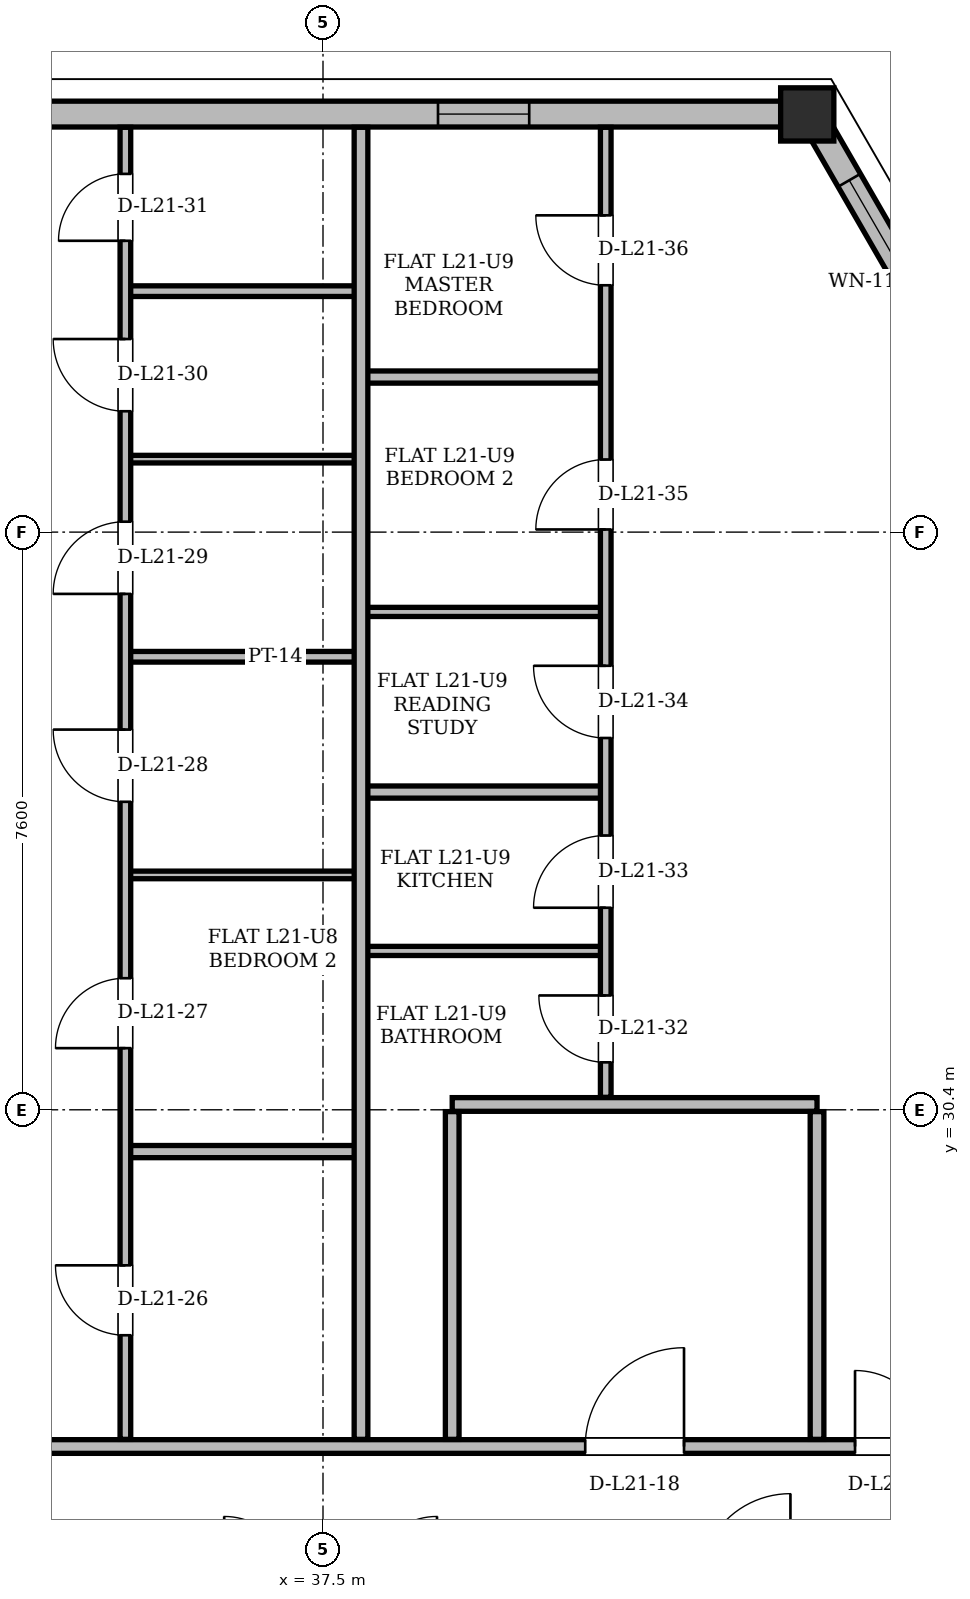
"""IFC4 building model, lengths in metres.
Left out: names, types, materials, properties, quantities, classifications, styles, units other than length and angle.
Written with IfcOpenShell. Run it as: python <this file> out.ifc"""

import sys

from ifc_helpers import new_model, si_unit, direction, frame, frame_2d, origin, origin_2d, place, context, subcontext, project, spatial, rectangle, hollow_rectangle, extrude, element, fill, save


model = new_model("IFC4")
c1 = context("Model", 3, precision=1e-05, world=origin(), true_north=direction((0.0, 1.0)))
c2 = subcontext(c1, "Body", "Model", "MODEL_VIEW")
j1 = project(units=[si_unit("LENGTHUNIT", "METRE"), si_unit("PLANEANGLEUNIT", "RADIAN")], contexts=[c1])
p1 = place(None, origin())
s1 = spatial("IfcSite", under=j1, at=p1, CompositionType="ELEMENT")
p2 = place(p1, origin())
s2 = spatial("IfcBuilding", under=s1, at=p2, CompositionType="ELEMENT")
p3 = place(p2, frame((0.0, 0.0, 82.5)))
s3 = spatial("IfcBuildingStorey", under=s2, at=p3, CompositionType="ELEMENT", Elevation=82.5)
p4 = place(p3, frame((43.921, 43.5, 0.004), z_axis=(-0.027795269096, -0.002582445539, 0.999610301063), x_axis=(0.092511107085, -0.995711652571, 0.0)))
e1 = element("IfcColumn", 1, at=p4, inside=s3, PredefinedType="COLUMN", context=c2, shape_type="SweptSolid", body=[
    extrude(hollow_rectangle(XDim=0.7, YDim=0.7, WallThickness=0.055, at=origin_2d()), origin(), (0.0, 0.0, 1.0), 3.593),
])
p5 = place(p3, frame((60.975, 13.961, 0.0), z_axis=(0.0, 0.0, 1.0), x_axis=(-0.499998999238, 0.866025981574, 0.0)))
e2 = element("IfcWall", 2, at=p5, inside=s3, PredefinedType="SOLIDWALL", context=c2, shape_type="SweptSolid", body=[
    extrude(rectangle(XDim=34.108, YDim=0.34, at=frame_2d((17.054, 0.0))), origin(), (0.0, 0.0, 1.0), 2.578),
])
p6 = place(p5, frame((6.369, 0.0, 0.0)))
e3 = element("IfcOpeningElement", 3, at=p6, cuts=e2, PredefinedType="OPENING", context=c2, shape_type="SweptSolid", body=[
    extrude(rectangle(XDim=1.5, YDim=2.2, at=frame_2d((0.75, 1.1))), frame((0.0, 0.17, 0.0), z_axis=(0.0, -1.0, 0.0), x_axis=(1.0, 0.0, 0.0)), (0.0, 0.0, 1.0), 0.34),
])
p7 = place(p5, frame((24.784, 0.0, 0.0)))
e4 = element("IfcOpeningElement", 4, at=p7, cuts=e2, PredefinedType="OPENING", context=c2, shape_type="SweptSolid", body=[
    extrude(rectangle(XDim=1.5, YDim=2.2, at=frame_2d((0.75, 1.1))), frame((0.0, 0.17, 0.0), z_axis=(0.0, -1.0, 0.0), x_axis=(1.0, 0.0, 0.0)), (0.0, 0.0, 1.0), 0.34),
])
p8 = place(p5, frame((1.56, 0.0, 0.85)))
e5 = element("IfcOpeningElement", 5, at=p8, cuts=e2, PredefinedType="OPENING", context=c2, shape_type="SweptSolid", body=[
    extrude(rectangle(XDim=1.2, YDim=1.48, at=frame_2d((0.6, 0.74))), frame((0.0, 0.17, 0.0), z_axis=(0.0, -1.0, 0.0), x_axis=(1.0, 0.0, 0.0)), (0.0, 0.0, 1.0), 0.34),
])
p9 = place(p5, frame((30.603, 0.0, 0.85)))
e6 = element("IfcOpeningElement", 6, at=p9, cuts=e2, PredefinedType="OPENING", context=c2, shape_type="SweptSolid", body=[
    extrude(rectangle(XDim=2.5, YDim=1.618, at=frame_2d((1.25, 0.809))), frame((0.0, 0.17, 0.0), z_axis=(0.0, -1.0, 0.0), x_axis=(1.0, 0.0, 0.0)), (0.0, 0.0, 1.0), 0.34),
])
p10 = place(p5, frame((20.212, 0.0, 0.85)))
e7 = element("IfcOpeningElement", 7, at=p10, cuts=e2, PredefinedType="OPENING", context=c2, shape_type="SweptSolid", body=[
    extrude(rectangle(XDim=2.4, YDim=1.618, at=frame_2d((1.2, 0.809))), frame((0.0, 0.17, 0.0), z_axis=(0.0, -1.0, 0.0), x_axis=(1.0, 0.0, 0.0)), (0.0, 0.0, 1.0), 0.34),
])
p11 = place(p5, frame((15.221, 0.0, 0.85)))
e8 = element("IfcOpeningElement", 8, at=p11, cuts=e2, PredefinedType="OPENING", context=c2, shape_type="SweptSolid", body=[
    extrude(rectangle(XDim=1.2, YDim=1.48, at=frame_2d((0.6, 0.74))), frame((0.0, 0.17, 0.0), z_axis=(0.0, -1.0, 0.0), x_axis=(1.0, 0.0, 0.0)), (0.0, 0.0, 1.0), 0.34),
])
p12 = place(p5, frame((17.561, 0.0, 0.85)))
e9 = element("IfcOpeningElement", 9, at=p12, cuts=e2, PredefinedType="OPENING", context=c2, shape_type="SweptSolid", body=[
    extrude(rectangle(XDim=1.4, YDim=1.6, at=frame_2d((0.7, 0.8))), frame((0.0, 0.17, 0.0), z_axis=(0.0, -1.0, 0.0), x_axis=(1.0, 0.0, 0.0)), (0.0, 0.0, 1.0), 0.34),
])
p13 = place(p3, frame((43.921, 43.5, 0.0), z_axis=(0.0, 0.0, 1.0), x_axis=(-1.0, 0.0, 0.0)))
e10 = element("IfcWall", 10, at=p13, inside=s3, PredefinedType="SOLIDWALL", context=c2, shape_type="SweptSolid", body=[
    extrude(rectangle(XDim=12.842, YDim=0.34, at=frame_2d((6.421, 0.0))), origin(), (0.0, 0.0, 1.0), 2.578),
])
p14 = place(p13, frame((3.708, 0.0, 0.85)))
e11 = element("IfcOpeningElement", 11, at=p14, cuts=e10, PredefinedType="OPENING", context=c2, shape_type="SweptSolid", body=[
    extrude(rectangle(XDim=1.2, YDim=1.48, at=frame_2d((0.6, 0.74))), frame((0.0, 0.17, 0.0), z_axis=(0.0, -1.0, 0.0), x_axis=(1.0, 0.0, 0.0)), (0.0, 0.0, 1.0), 0.34),
])
p15 = place(p3, frame((27.55, 25.97, 0.0), z_axis=(0.0, 0.0, 1.0), x_axis=(1.0, 0.0, 0.0)))
e12 = element("IfcWall", 12, at=p15, inside=s3, PredefinedType="PARTITIONING", context=c2, shape_type="SweptSolid", body=[
    extrude(rectangle(XDim=19.9, YDim=0.18, at=frame_2d((9.95, 0.0))), origin(), (0.0, 0.0, 1.0), 2.814),
])
p16 = place(p15, frame((0.425, 0.0, 0.0)))
e13 = element("IfcOpeningElement", 13, at=p16, cuts=e12, PredefinedType="OPENING", context=c2, shape_type="SweptSolid", body=[
    extrude(rectangle(XDim=1.0, YDim=2.18, at=frame_2d((0.5, 1.09))), frame((0.0, 0.09, 0.0), z_axis=(0.0, -1.0, 0.0), x_axis=(1.0, 0.0, 0.0)), (0.0, 0.0, 1.0), 0.18),
])
p17 = place(p15, frame((4.222, 0.0, 0.0)))
e14 = element("IfcOpeningElement", 14, at=p17, cuts=e12, PredefinedType="OPENING", context=c2, shape_type="SweptSolid", body=[
    extrude(rectangle(XDim=1.0, YDim=2.18, at=frame_2d((0.5, 1.09))), frame((0.0, 0.09, 0.0), z_axis=(0.0, -1.0, 0.0), x_axis=(1.0, 0.0, 0.0)), (0.0, 0.0, 1.0), 0.18),
])
p18 = place(p15, frame((13.4, 0.0, 0.0)))
e15 = element("IfcOpeningElement", 15, at=p18, cuts=e12, PredefinedType="OPENING", context=c2, shape_type="SweptSolid", body=[
    extrude(rectangle(XDim=1.3, YDim=2.2, at=frame_2d((0.65, 1.1))), frame((0.0, 0.09, 0.0), z_axis=(0.0, -1.0, 0.0), x_axis=(1.0, 0.0, 0.0)), (0.0, 0.0, 1.0), 0.18),
])
p19 = place(p15, frame((16.95, 0.0, 0.0)))
e16 = element("IfcOpeningElement", 16, at=p19, cuts=e12, PredefinedType="OPENING", context=c2, shape_type="SweptSolid", body=[
    extrude(rectangle(XDim=1.0, YDim=2.18, at=frame_2d((0.5, 1.09))), frame((0.0, 0.09, 0.0), z_axis=(0.0, -1.0, 0.0), x_axis=(1.0, 0.0, 0.0)), (0.0, 0.0, 1.0), 0.18),
])
p20 = place(p3, frame((34.9, 29.85, 0.0), z_axis=(0.0, 0.0, 1.0), x_axis=(1.0, 0.0, 0.0)))
e17 = element("IfcWall", 17, at=p20, inside=s3, PredefinedType="PARTITIONING", context=c2, shape_type="SweptSolid", body=[
    extrude(rectangle(XDim=3.15, YDim=0.16, at=frame_2d((1.575, 0.0))), origin(), (0.0, 0.0, 1.0), 3.36),
])
p21 = place(p3, frame((39.2, 30.47, 0.0), z_axis=(0.0, 0.0, 1.0), x_axis=(1.0, 0.0, 0.0)))
e18 = element("IfcWall", 18, at=p21, inside=s3, PredefinedType="PARTITIONING", context=c2, shape_type="SweptSolid", body=[
    extrude(rectangle(XDim=4.8, YDim=0.18, at=frame_2d((2.4, 0.0))), origin(), (0.0, 0.0, 1.0), 3.36),
])
p22 = place(p3, frame((37.95, 32.49, 0.0), z_axis=(0.0, 0.0, 1.0), x_axis=(1.0, 0.0, 0.0)))
e19 = element("IfcWall", 19, at=p22, inside=s3, PredefinedType="PARTITIONING", context=c2, shape_type="SweptSolid", body=[
    extrude(rectangle(XDim=3.27, YDim=0.12, at=frame_2d((1.635, 0.0))), origin(), (0.0, 0.0, 1.0), 3.36),
])
p23 = place(p3, frame((34.9, 33.49, 0.0), z_axis=(0.0, 0.0, 1.0), x_axis=(1.0, 0.0, 0.0)))
e20 = element("IfcWall", 20, at=p23, inside=s3, PredefinedType="PARTITIONING", context=c2, shape_type="SweptSolid", body=[
    extrude(rectangle(XDim=3.15, YDim=0.1, at=frame_2d((1.575, 0.0))), origin(), (0.0, 0.0, 1.0), 3.36),
])
p24 = place(p3, frame((37.95, 34.58, 0.0), z_axis=(0.0, 0.0, 1.0), x_axis=(1.0, 0.0, 0.0)))
e21 = element("IfcWall", 21, at=p24, inside=s3, PredefinedType="PARTITIONING", context=c2, shape_type="SweptSolid", body=[
    extrude(rectangle(XDim=3.27, YDim=0.16, at=frame_2d((1.635, 0.0))), origin(), (0.0, 0.0, 1.0), 3.36),
])
p25 = place(p3, frame((34.9, 36.36, 0.0), z_axis=(0.0, 0.0, 1.0), x_axis=(1.0, 0.0, 0.0)))
e22 = element("IfcWall", 22, at=p25, inside=s3, PredefinedType="PARTITIONING", context=c2, shape_type="SweptSolid", body=[
    extrude(rectangle(XDim=3.15, YDim=0.14, at=frame_2d((1.575, 0.0))), origin(), (0.0, 0.0, 1.0), 3.36),
])
p26 = place(p3, frame((37.95, 36.95, 0.0), z_axis=(0.0, 0.0, 1.0), x_axis=(1.0, 0.0, 0.0)))
e23 = element("IfcWall", 23, at=p26, inside=s3, PredefinedType="PARTITIONING", context=c2, shape_type="SweptSolid", body=[
    extrude(rectangle(XDim=3.27, YDim=0.12, at=frame_2d((1.635, 0.0))), origin(), (0.0, 0.0, 1.0), 3.36),
])
p27 = place(p3, frame((34.9, 38.96, 0.0), z_axis=(0.0, 0.0, 1.0), x_axis=(1.0, 0.0, 0.0)))
e24 = element("IfcWall", 24, at=p27, inside=s3, PredefinedType="PARTITIONING", context=c2, shape_type="SweptSolid", body=[
    extrude(rectangle(XDim=3.15, YDim=0.1, at=frame_2d((1.575, 0.0))), origin(), (0.0, 0.0, 1.0), 3.36),
])
p28 = place(p3, frame((37.95, 40.04, 0.0), z_axis=(0.0, 0.0, 1.0), x_axis=(1.0, 0.0, 0.0)))
e25 = element("IfcWall", 25, at=p28, inside=s3, PredefinedType="PARTITIONING", context=c2, shape_type="SweptSolid", body=[
    extrude(rectangle(XDim=3.27, YDim=0.16, at=frame_2d((1.635, 0.0))), origin(), (0.0, 0.0, 1.0), 3.36),
])
p29 = place(p3, frame((34.9, 41.17, 0.0), z_axis=(0.0, 0.0, 1.0), x_axis=(1.0, 0.0, 0.0)))
e26 = element("IfcWall", 26, at=p29, inside=s3, PredefinedType="PARTITIONING", context=c2, shape_type="SweptSolid", body=[
    extrude(rectangle(XDim=3.15, YDim=0.14, at=frame_2d((1.575, 0.0))), origin(), (0.0, 0.0, 1.0), 3.36),
])
p30 = place(p3, frame((34.9, 26.064, 0.0), z_axis=(0.0, 0.0, 1.0), x_axis=(0.0, 1.0, 0.0)))
e27 = element("IfcWall", 27, at=p30, inside=s3, PredefinedType="PARTITIONING", context=c2, shape_type="SweptSolid", body=[
    extrude(rectangle(XDim=17.262, YDim=0.14, at=frame_2d((8.631, 0.0))), origin(), (0.0, 0.0, 1.0), 3.36),
])
p31 = place(p30, frame((1.37, 0.0, 0.0)))
e28 = element("IfcOpeningElement", 28, at=p31, cuts=e27, PredefinedType="OPENING", context=c2, shape_type="SweptSolid", body=[
    extrude(rectangle(XDim=0.92, YDim=2.12, at=frame_2d((0.46, 1.06))), frame((0.0, 0.07, 0.0), z_axis=(0.0, -1.0, 0.0), x_axis=(1.0, 0.0, 0.0)), (0.0, 0.0, 1.0), 0.14),
])
p32 = place(p30, frame((5.147, 0.0, 0.0)))
e29 = element("IfcOpeningElement", 29, at=p32, cuts=e27, PredefinedType="OPENING", context=c2, shape_type="SweptSolid", body=[
    extrude(rectangle(XDim=0.92, YDim=2.12, at=frame_2d((0.46, 1.06))), frame((0.0, 0.07, 0.0), z_axis=(0.0, -1.0, 0.0), x_axis=(1.0, 0.0, 0.0)), (0.0, 0.0, 1.0), 0.14),
])
p33 = place(p30, frame((8.388, 0.0, 0.0)))
e30 = element("IfcOpeningElement", 30, at=p33, cuts=e27, PredefinedType="OPENING", context=c2, shape_type="SweptSolid", body=[
    extrude(rectangle(XDim=0.95, YDim=2.1, at=frame_2d((0.475, 1.05))), frame((0.0, 0.07, 0.0), z_axis=(0.0, -1.0, 0.0), x_axis=(1.0, 0.0, 0.0)), (0.0, 0.0, 1.0), 0.14),
])
p34 = place(p30, frame((11.123, 0.0, 0.0)))
e31 = element("IfcOpeningElement", 31, at=p34, cuts=e27, PredefinedType="OPENING", context=c2, shape_type="SweptSolid", body=[
    extrude(rectangle(XDim=0.95, YDim=2.1, at=frame_2d((0.475, 1.05))), frame((0.0, 0.07, 0.0), z_axis=(0.0, -1.0, 0.0), x_axis=(1.0, 0.0, 0.0)), (0.0, 0.0, 1.0), 0.14),
])
p35 = place(p30, frame((13.526, 0.0, 0.0)))
e32 = element("IfcOpeningElement", 32, at=p35, cuts=e27, PredefinedType="OPENING", context=c2, shape_type="SweptSolid", body=[
    extrude(rectangle(XDim=0.95, YDim=2.1, at=frame_2d((0.475, 1.05))), frame((0.0, 0.07, 0.0), z_axis=(0.0, -1.0, 0.0), x_axis=(1.0, 0.0, 0.0)), (0.0, 0.0, 1.0), 0.14),
])
p36 = place(p30, frame((15.769, 0.0, 0.0)))
e33 = element("IfcOpeningElement", 33, at=p36, cuts=e27, PredefinedType="OPENING", context=c2, shape_type="SweptSolid", body=[
    extrude(rectangle(XDim=0.88, YDim=2.08, at=frame_2d((0.44, 1.04))), frame((0.0, 0.07, 0.0), z_axis=(0.0, -1.0, 0.0), x_axis=(1.0, 0.0, 0.0)), (0.0, 0.0, 1.0), 0.14),
])
p37 = place(p3, frame((38.0, 26.064, 0.0), z_axis=(0.0, 0.0, 1.0), x_axis=(0.0, 1.0, 0.0)))
e34 = element("IfcWall", 34, at=p37, inside=s3, PredefinedType="PARTITIONING", context=c2, shape_type="SweptSolid", body=[
    extrude(rectangle(XDim=17.262, YDim=0.18, at=frame_2d((8.631, 0.0))), origin(), (0.0, 0.0, 1.0), 3.36),
])
p38 = place(p3, frame((39.2, 26.064, 0.0), z_axis=(0.0, 0.0, 1.0), x_axis=(0.0, 1.0, 0.0)))
e35 = element("IfcWall", 35, at=p38, inside=s3, PredefinedType="PARTITIONING", context=c2, shape_type="SweptSolid", body=[
    extrude(rectangle(XDim=4.312, YDim=0.18, at=frame_2d((2.156, 0.0))), origin(), (0.0, 0.0, 1.0), 3.36),
])
p39 = place(p3, frame((41.22, 30.564, 0.0), z_axis=(0.0, 0.0, 1.0), x_axis=(0.0, 1.0, 0.0)))
e36 = element("IfcWall", 36, at=p39, inside=s3, PredefinedType="PARTITIONING", context=c2, shape_type="SweptSolid", body=[
    extrude(rectangle(XDim=12.762, YDim=0.14, at=frame_2d((6.381, 0.0))), origin(), (0.0, 0.0, 1.0), 3.36),
])
p40 = place(p39, frame((0.46, 0.0, 0.0)))
e37 = element("IfcOpeningElement", 37, at=p40, cuts=e36, PredefinedType="OPENING", context=c2, shape_type="SweptSolid", body=[
    extrude(rectangle(XDim=0.88, YDim=2.08, at=frame_2d((0.44, 1.04))), frame((0.0, 0.07, 0.0), z_axis=(0.0, -1.0, 0.0), x_axis=(1.0, 0.0, 0.0)), (0.0, 0.0, 1.0), 0.14),
])
p41 = place(p39, frame((2.494, 0.0, 0.0)))
e38 = element("IfcOpeningElement", 38, at=p41, cuts=e36, PredefinedType="OPENING", context=c2, shape_type="SweptSolid", body=[
    extrude(rectangle(XDim=0.95, YDim=2.1, at=frame_2d((0.475, 1.05))), frame((0.0, 0.07, 0.0), z_axis=(0.0, -1.0, 0.0), x_axis=(1.0, 0.0, 0.0)), (0.0, 0.0, 1.0), 0.14),
])
p42 = place(p39, frame((4.727, 0.0, 0.0)))
e39 = element("IfcOpeningElement", 39, at=p42, cuts=e36, PredefinedType="OPENING", context=c2, shape_type="SweptSolid", body=[
    extrude(rectangle(XDim=0.95, YDim=2.1, at=frame_2d((0.475, 1.05))), frame((0.0, 0.07, 0.0), z_axis=(0.0, -1.0, 0.0), x_axis=(1.0, 0.0, 0.0)), (0.0, 0.0, 1.0), 0.14),
])
p43 = place(p39, frame((7.471, 0.0, 0.0)))
e40 = element("IfcOpeningElement", 40, at=p43, cuts=e36, PredefinedType="OPENING", context=c2, shape_type="SweptSolid", body=[
    extrude(rectangle(XDim=0.92, YDim=2.12, at=frame_2d((0.46, 1.06))), frame((0.0, 0.07, 0.0), z_axis=(0.0, -1.0, 0.0), x_axis=(1.0, 0.0, 0.0)), (0.0, 0.0, 1.0), 0.14),
])
p44 = place(p39, frame((10.683, 0.0, 0.0)))
e41 = element("IfcOpeningElement", 41, at=p44, cuts=e36, PredefinedType="OPENING", context=c2, shape_type="SweptSolid", body=[
    extrude(rectangle(XDim=0.92, YDim=2.12, at=frame_2d((0.46, 1.06))), frame((0.0, 0.07, 0.0), z_axis=(0.0, -1.0, 0.0), x_axis=(1.0, 0.0, 0.0)), (0.0, 0.0, 1.0), 0.14),
])
p45 = place(p3, frame((44.0, 26.064, 0.0), z_axis=(0.0, 0.0, 1.0), x_axis=(0.0, 1.0, 0.0)))
e42 = element("IfcWall", 42, at=p45, inside=s3, PredefinedType="PARTITIONING", context=c2, shape_type="SweptSolid", body=[
    extrude(rectangle(XDim=4.312, YDim=0.18, at=frame_2d((2.156, 0.0))), origin(), (0.0, 0.0, 1.0), 2.946),
])
p46 = place(p9, origin())
e43 = element("IfcWindow", 43, at=p46, inside=s3, PartitioningType="SINGLE_PANEL", PredefinedType="WINDOW", context=c2, shape_type="SweptSolid", body=[
    extrude(rectangle(XDim=2.5, YDim=1.618, at=frame_2d((1.25, 0.809))), frame((0.0, 0.03, 0.0), z_axis=(0.0, -1.0, 0.0), x_axis=(1.0, 0.0, 0.0)), (0.0, 0.0, 1.0), 0.06),
])
fill(e6, e43)
p47 = place(p14, origin())
e44 = element("IfcWindow", 44, at=p47, inside=s3, PartitioningType="SINGLE_PANEL", PredefinedType="WINDOW", context=c2, shape_type="SweptSolid", body=[
    extrude(rectangle(XDim=1.2, YDim=1.48, at=frame_2d((0.6, 0.74))), frame((0.0, 0.03, 0.0), z_axis=(0.0, -1.0, 0.0), x_axis=(1.0, 0.0, 0.0)), (0.0, 0.0, 1.0), 0.06),
])
fill(e11, e44)
p48 = place(p18, origin())
e45 = element("IfcDoor", 45, at=p48, inside=s3, OperationType="SINGLE_SWING_RIGHT", PredefinedType="DOOR", context=c2, shape_type="SweptSolid", body=[
    extrude(rectangle(XDim=1.3, YDim=2.2, at=frame_2d((0.65, 1.1))), frame((0.0, 0.025, 0.0), z_axis=(0.0, -1.0, 0.0), x_axis=(1.0, 0.0, 0.0)), (0.0, 0.0, 1.0), 0.05),
])
fill(e15, e45)
p49 = place(p19, origin())
e46 = element("IfcDoor", 46, at=p49, inside=s3, OperationType="SINGLE_SWING_LEFT", PredefinedType="DOOR", context=c2, shape_type="SweptSolid", body=[
    extrude(rectangle(XDim=1.0, YDim=2.18, at=frame_2d((0.5, 1.09))), frame((0.0, 0.025, 0.0), z_axis=(0.0, -1.0, 0.0), x_axis=(1.0, 0.0, 0.0)), (0.0, 0.0, 1.0), 0.05),
])
fill(e16, e46)
p50 = place(p31, origin())
e47 = element("IfcDoor", 47, at=p50, inside=s3, OperationType="SINGLE_SWING_RIGHT", PredefinedType="DOOR", context=c2, shape_type="SweptSolid", body=[
    extrude(rectangle(XDim=0.92, YDim=2.12, at=frame_2d((0.46, 1.06))), frame((0.0, 0.025, 0.0), z_axis=(0.0, -1.0, 0.0), x_axis=(1.0, 0.0, 0.0)), (0.0, 0.0, 1.0), 0.05),
])
fill(e28, e47)
p51 = place(p32, origin())
e48 = element("IfcDoor", 48, at=p51, inside=s3, OperationType="SINGLE_SWING_LEFT", PredefinedType="DOOR", context=c2, shape_type="SweptSolid", body=[
    extrude(rectangle(XDim=0.92, YDim=2.12, at=frame_2d((0.46, 1.06))), frame((0.0, 0.025, 0.0), z_axis=(0.0, -1.0, 0.0), x_axis=(1.0, 0.0, 0.0)), (0.0, 0.0, 1.0), 0.05),
])
fill(e29, e48)
p52 = place(p33, origin())
e49 = element("IfcDoor", 49, at=p52, inside=s3, OperationType="SINGLE_SWING_RIGHT", PredefinedType="DOOR", context=c2, shape_type="SweptSolid", body=[
    extrude(rectangle(XDim=0.95, YDim=2.1, at=frame_2d((0.475, 1.05))), frame((0.0, 0.025, 0.0), z_axis=(0.0, -1.0, 0.0), x_axis=(1.0, 0.0, 0.0)), (0.0, 0.0, 1.0), 0.05),
])
fill(e30, e49)
p53 = place(p34, origin())
e50 = element("IfcDoor", 50, at=p53, inside=s3, OperationType="SINGLE_SWING_LEFT", PredefinedType="DOOR", context=c2, shape_type="SweptSolid", body=[
    extrude(rectangle(XDim=0.95, YDim=2.1, at=frame_2d((0.475, 1.05))), frame((0.0, 0.025, 0.0), z_axis=(0.0, -1.0, 0.0), x_axis=(1.0, 0.0, 0.0)), (0.0, 0.0, 1.0), 0.05),
])
fill(e31, e50)
p54 = place(p35, origin())
e51 = element("IfcDoor", 51, at=p54, inside=s3, OperationType="SINGLE_SWING_RIGHT", PredefinedType="DOOR", context=c2, shape_type="SweptSolid", body=[
    extrude(rectangle(XDim=0.95, YDim=2.1, at=frame_2d((0.475, 1.05))), frame((0.0, 0.025, 0.0), z_axis=(0.0, -1.0, 0.0), x_axis=(1.0, 0.0, 0.0)), (0.0, 0.0, 1.0), 0.05),
])
fill(e32, e51)
p55 = place(p36, origin())
e52 = element("IfcDoor", 52, at=p55, inside=s3, OperationType="SINGLE_SWING_LEFT", PredefinedType="DOOR", context=c2, shape_type="SweptSolid", body=[
    extrude(rectangle(XDim=0.88, YDim=2.08, at=frame_2d((0.44, 1.04))), frame((0.0, 0.025, 0.0), z_axis=(0.0, -1.0, 0.0), x_axis=(1.0, 0.0, 0.0)), (0.0, 0.0, 1.0), 0.05),
])
fill(e33, e52)
p56 = place(p40, origin())
e53 = element("IfcDoor", 53, at=p56, inside=s3, OperationType="SINGLE_SWING_RIGHT", PredefinedType="DOOR", context=c2, shape_type="SweptSolid", body=[
    extrude(rectangle(XDim=0.88, YDim=2.08, at=frame_2d((0.44, 1.04))), frame((0.0, 0.025, 0.0), z_axis=(0.0, -1.0, 0.0), x_axis=(1.0, 0.0, 0.0)), (0.0, 0.0, 1.0), 0.05),
])
fill(e37, e53)
p57 = place(p41, origin())
e54 = element("IfcDoor", 54, at=p57, inside=s3, OperationType="SINGLE_SWING_LEFT", PredefinedType="DOOR", context=c2, shape_type="SweptSolid", body=[
    extrude(rectangle(XDim=0.95, YDim=2.1, at=frame_2d((0.475, 1.05))), frame((0.0, 0.025, 0.0), z_axis=(0.0, -1.0, 0.0), x_axis=(1.0, 0.0, 0.0)), (0.0, 0.0, 1.0), 0.05),
])
fill(e38, e54)
p58 = place(p42, origin())
e55 = element("IfcDoor", 55, at=p58, inside=s3, OperationType="SINGLE_SWING_RIGHT", PredefinedType="DOOR", context=c2, shape_type="SweptSolid", body=[
    extrude(rectangle(XDim=0.95, YDim=2.1, at=frame_2d((0.475, 1.05))), frame((0.0, 0.025, 0.0), z_axis=(0.0, -1.0, 0.0), x_axis=(1.0, 0.0, 0.0)), (0.0, 0.0, 1.0), 0.05),
])
fill(e39, e55)
p59 = place(p43, origin())
e56 = element("IfcDoor", 56, at=p59, inside=s3, OperationType="SINGLE_SWING_LEFT", PredefinedType="DOOR", context=c2, shape_type="SweptSolid", body=[
    extrude(rectangle(XDim=0.92, YDim=2.12, at=frame_2d((0.46, 1.06))), frame((0.0, 0.025, 0.0), z_axis=(0.0, -1.0, 0.0), x_axis=(1.0, 0.0, 0.0)), (0.0, 0.0, 1.0), 0.05),
])
fill(e40, e56)
p60 = place(p44, origin())
e57 = element("IfcDoor", 57, at=p60, inside=s3, OperationType="SINGLE_SWING_RIGHT", PredefinedType="DOOR", context=c2, shape_type="SweptSolid", body=[
    extrude(rectangle(XDim=0.92, YDim=2.12, at=frame_2d((0.46, 1.06))), frame((0.0, 0.025, 0.0), z_axis=(0.0, -1.0, 0.0), x_axis=(1.0, 0.0, 0.0)), (0.0, 0.0, 1.0), 0.05),
])
fill(e41, e57)
save(model, sys.argv[1])
